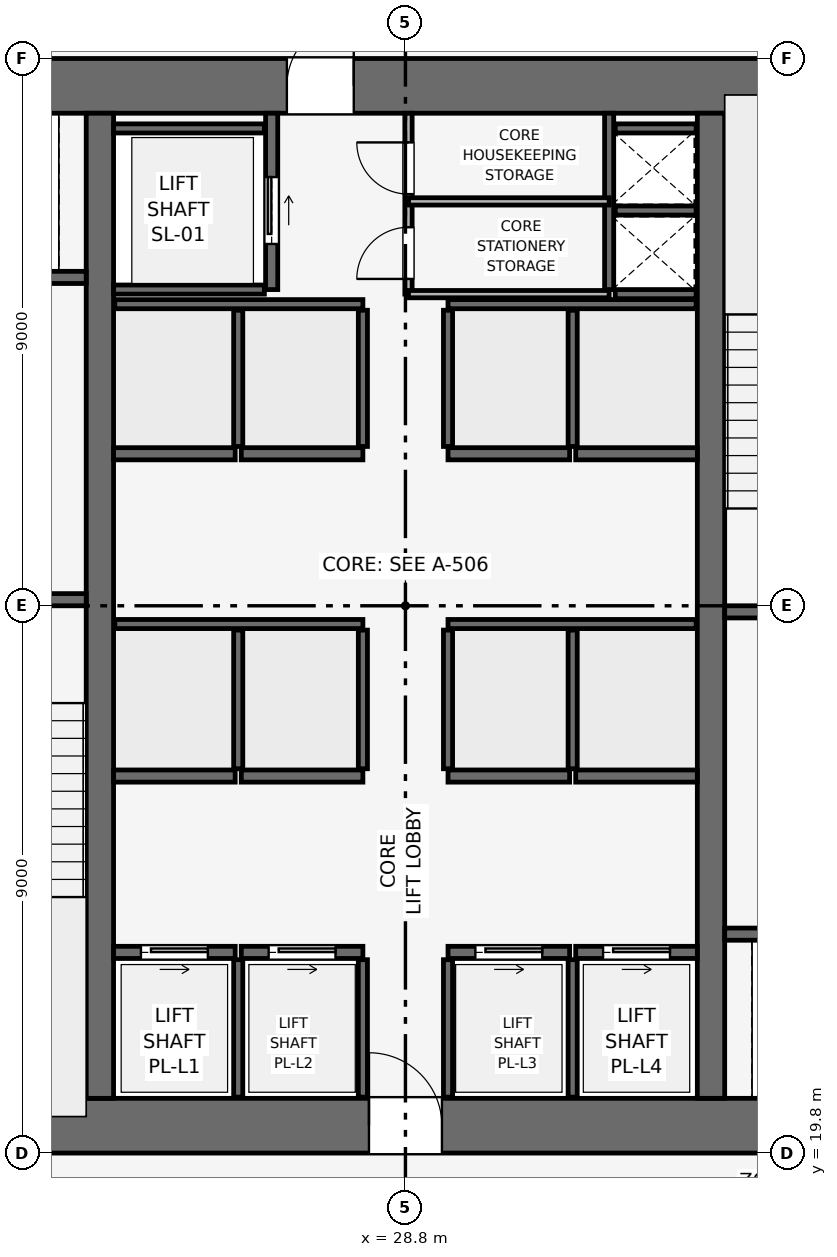
"""IFC4 building model, lengths in metres.
Left out: names, types, materials, properties, quantities, classifications, styles, units other than length and angle.
Written with IfcOpenShell. Run it as: python <this file> out.ifc"""

import sys

from ifc_helpers import new_model, si_unit, direction, frame, frame_2d, origin, place, context, subcontext, project, spatial, rectangle, extrude, element, fill, save


model = new_model("IFC4")
c1 = context("Model", 3, precision=1e-05, world=origin(), true_north=direction((0.0, 1.0)))
c2 = subcontext(c1, "Body", "Model", "MODEL_VIEW")
j1 = project(units=[si_unit("LENGTHUNIT", "METRE"), si_unit("PLANEANGLEUNIT", "RADIAN")], contexts=[c1])
p1 = place(None, origin())
s1 = spatial("IfcSite", under=j1, at=p1, CompositionType="ELEMENT")
p2 = place(p1, origin())
s2 = spatial("IfcBuilding", under=s1, at=p2, CompositionType="ELEMENT")
p3 = place(p2, frame((0.0, 0.0, 117.3)))
s3 = spatial("IfcBuildingStorey", under=s2, at=p3, CompositionType="ELEMENT", Elevation=117.3)
p4 = place(p3, frame((19.8, 20.25, 0.0), z_axis=(0.0, 0.0, 1.0), x_axis=(1.0, 0.0, 0.0)))
e1 = element("IfcWall", 1, at=p4, inside=s3, PredefinedType="SHEAR", context=c2, shape_type="SweptSolid", body=[
    extrude(rectangle(XDim=18.0, YDim=0.9, at=frame_2d((9.0, 0.0))), origin(), (0.0, 0.0, 1.0), 3.9),
])
p5 = place(p4, frame((8.4, 0.0, 0.0)))
e2 = element("IfcOpeningElement", 2, at=p5, cuts=e1, PredefinedType="OPENING", context=c2, shape_type="SweptSolid", body=[
    extrude(rectangle(XDim=1.2, YDim=2.2, at=frame_2d((0.6, 1.1))), frame((0.0, 0.46, 0.0), z_axis=(0.0, -1.0, 0.0), x_axis=(1.0, 0.0, 0.0)), (0.0, 0.0, 1.0), 0.92),
])
p6 = place(p3, frame((19.8, 37.35, 0.0), z_axis=(0.0, 0.0, 1.0), x_axis=(1.0, 0.0, 0.0)))
e3 = element("IfcWall", 3, at=p6, inside=s3, PredefinedType="SHEAR", context=c2, shape_type="SweptSolid", body=[
    extrude(rectangle(XDim=18.0, YDim=0.9, at=frame_2d((9.0, 0.0))), origin(), (0.0, 0.0, 1.0), 3.9),
])
p7 = place(p6, frame((7.05, 0.0, 0.0)))
e4 = element("IfcOpeningElement", 4, at=p7, cuts=e3, PredefinedType="OPENING", context=c2, shape_type="SweptSolid", body=[
    extrude(rectangle(XDim=1.1, YDim=2.15, at=frame_2d((0.55, 1.075))), frame((0.0, 0.46, 0.0), z_axis=(0.0, -1.0, 0.0), x_axis=(1.0, 0.0, 0.0)), (0.0, 0.0, 1.0), 0.92),
])
for number, where, z_axis, x_axis in (
    (5, (23.775, 20.7, 0.0), (0.0, 0.0, 1.0), (0.0, 1.0, 0.0)),
    (6, (33.825, 20.7, 0.0), (0.0, 0.0, 1.0), (0.0, 1.0, 0.0)),
):
    element("IfcWall", number, at=place(p3, frame(where, z_axis=z_axis, x_axis=x_axis)), inside=s3, PredefinedType="SHEAR", context=c2, shape_type="SweptSolid", body=[
        extrude(rectangle(XDim=16.2, YDim=0.45, at=frame_2d((8.1, 0.0))), origin(), (0.0, 0.0, 1.0), 3.9),
    ])
p8 = place(p3, frame((20.4, 28.9, 0.0), z_axis=(0.0, 0.0, 1.0), x_axis=(1.0, 0.0, 0.0)))
e7 = element("IfcWall", 7, at=p8, inside=s3, PredefinedType="SHEAR", context=c2, shape_type="SweptSolid", body=[
    extrude(rectangle(XDim=3.15, YDim=0.2, at=frame_2d((1.575, 0.0))), origin(), (0.0, 0.0, 1.0), 3.65),
])
p9 = place(p8, frame((0.8, 0.0, 0.0)))
e8 = element("IfcOpeningElement", 8, at=p9, cuts=e7, PredefinedType="OPENING", context=c2, shape_type="SweptSolid", body=[
    extrude(rectangle(XDim=1.0, YDim=2.1, at=frame_2d((0.5, 1.05))), frame((0.0, 0.11, 0.0), z_axis=(0.0, -1.0, 0.0), x_axis=(1.0, 0.0, 0.0)), (0.0, 0.0, 1.0), 0.22),
])
p10 = place(p3, frame((34.05, 28.7, 0.0), z_axis=(0.0, 0.0, 1.0), x_axis=(1.0, 0.0, 0.0)))
e9 = element("IfcWall", 9, at=p10, inside=s3, PredefinedType="SHEAR", context=c2, shape_type="SweptSolid", body=[
    extrude(rectangle(XDim=3.15, YDim=0.2, at=frame_2d((1.575, 0.0))), origin(), (0.0, 0.0, 1.0), 3.65),
])
p11 = place(p10, frame((0.8, 0.0, 0.0)))
e10 = element("IfcOpeningElement", 10, at=p11, cuts=e9, PredefinedType="OPENING", context=c2, shape_type="SweptSolid", body=[
    extrude(rectangle(XDim=1.0, YDim=2.1, at=frame_2d((0.5, 1.05))), frame((0.0, 0.11, 0.0), z_axis=(0.0, -1.0, 0.0), x_axis=(1.0, 0.0, 0.0)), (0.0, 0.0, 1.0), 0.22),
])
p12 = place(p3, frame((32.15, 34.0, 0.0), z_axis=(0.0, 0.0, 1.0), x_axis=(0.0, 1.0, 0.0)))
e11 = element("IfcWall", 11, at=p12, inside=s3, PredefinedType="SHEAR", context=c2, shape_type="SweptSolid", body=[
    extrude(rectangle(XDim=2.9, YDim=0.15, at=frame_2d((1.45, 0.0))), origin(), (0.0, 0.0, 1.0), 3.65),
])
for number, where, z_axis, x_axis in (
    (12, (32.25, 33.925, 0.0), (0.0, 0.0, 1.0), (1.0, 0.0, 0.0)),
    (13, (32.25, 35.3, 0.0), (0.0, 0.0, 1.0), (1.0, 0.0, 0.0)),
):
    element("IfcWall", number, at=place(p3, frame(where, z_axis=z_axis, x_axis=x_axis)), inside=s3, PredefinedType="SHEAR", context=c2, shape_type="SweptSolid", body=[
        extrude(rectangle(XDim=1.33, YDim=0.15, at=frame_2d((0.665, 0.0))), origin(), (0.0, 0.0, 1.0), 3.65),
    ])
p13 = place(p3, frame((20.5, 34.2, 0.0), z_axis=(0.0, 0.0, 1.0), x_axis=(1.0, 0.0, 0.0)))
e14 = element("IfcWall", 14, at=p13, inside=s3, PredefinedType="SHEAR", context=c2, shape_type="SweptSolid", body=[
    extrude(rectangle(XDim=3.05, YDim=0.2, at=frame_2d((1.525, 0.0))), origin(), (0.0, 0.0, 1.0), 3.65),
])
p14 = place(p13, frame((0.75, 0.0, 0.0)))
e15 = element("IfcOpeningElement", 15, at=p14, cuts=e14, PredefinedType="OPENING", context=c2, shape_type="SweptSolid", body=[
    extrude(rectangle(XDim=1.1, YDim=2.15, at=frame_2d((0.55, 1.075))), frame((0.0, 0.11, 0.0), z_axis=(0.0, -1.0, 0.0), x_axis=(1.0, 0.0, 0.0)), (0.0, 0.0, 1.0), 0.22),
])
p15 = place(p3, frame((34.05, 23.4, 0.0), z_axis=(0.0, 0.0, 1.0), x_axis=(1.0, 0.0, 0.0)))
e16 = element("IfcWall", 16, at=p15, inside=s3, PredefinedType="SHEAR", context=c2, shape_type="SweptSolid", body=[
    extrude(rectangle(XDim=3.05, YDim=0.2, at=frame_2d((1.525, 0.0))), origin(), (0.0, 0.0, 1.0), 3.65),
])
p16 = place(p15, frame((1.2, 0.0, 0.0)))
e17 = element("IfcOpeningElement", 17, at=p16, cuts=e16, PredefinedType="OPENING", context=c2, shape_type="SweptSolid", body=[
    extrude(rectangle(XDim=1.1, YDim=2.15, at=frame_2d((0.55, 1.075))), frame((0.0, 0.11, 0.0), z_axis=(0.0, -1.0, 0.0), x_axis=(1.0, 0.0, 0.0)), (0.0, 0.0, 1.0), 0.22),
])
p17 = place(p3, frame((26.6, 34.0, 0.0), z_axis=(0.0, 0.0, 1.0), x_axis=(0.0, 1.0, 0.0)))
e18 = element("IfcWall", 18, at=p17, inside=s3, PredefinedType="SHEAR", context=c2, shape_type="SweptSolid", body=[
    extrude(rectangle(XDim=2.9, YDim=0.2, at=frame_2d((1.45, 0.0))), origin(), (0.0, 0.0, 1.0), 3.65),
])
p18 = place(p17, frame((0.75, 0.0, 0.0)))
e19 = element("IfcOpeningElement", 19, at=p18, cuts=e18, PredefinedType="OPENING", context=c2, shape_type="SweptSolid", body=[
    extrude(rectangle(XDim=1.1, YDim=2.15, at=frame_2d((0.55, 1.075))), frame((0.0, 0.11, 0.0), z_axis=(0.0, -1.0, 0.0), x_axis=(1.0, 0.0, 0.0)), (0.0, 0.0, 1.0), 0.22),
])
for number, where, z_axis, x_axis in (
    (20, (24.0, 34.0, 0.0), (0.0, 0.0, 1.0), (1.0, 0.0, 0.0)),
    (21, (24.0, 36.65, 0.0), (0.0, 0.0, 1.0), (1.0, 0.0, 0.0)),
):
    element("IfcWall", number, at=place(p3, frame(where, z_axis=z_axis, x_axis=x_axis)), inside=s3, PredefinedType="SHEAR", context=c2, shape_type="SweptSolid", body=[
        extrude(rectangle(XDim=2.48, YDim=0.15, at=frame_2d((1.24, 0.0))), origin(), (0.0, 0.0, 1.0), 3.65),
    ])
p19 = place(p3, frame((24.0, 23.1, 0.0), z_axis=(0.0, 0.0, 1.0), x_axis=(1.0, 0.0, 0.0)))
e22 = element("IfcWall", 22, at=p19, inside=s3, PredefinedType="SHEAR", context=c2, shape_type="SweptSolid", body=[
    extrude(rectangle(XDim=2.0, YDim=0.2, at=frame_2d((1.0, 0.0))), origin(), (0.0, 0.0, 1.0), 3.65),
])
p20 = place(p19, frame((0.45, 0.0, 0.0)))
e23 = element("IfcOpeningElement", 23, at=p20, cuts=e22, PredefinedType="OPENING", context=c2, shape_type="SweptSolid", body=[
    extrude(rectangle(XDim=1.1, YDim=2.15, at=frame_2d((0.55, 1.075))), frame((0.0, 0.11, 0.0), z_axis=(0.0, -1.0, 0.0), x_axis=(1.0, 0.0, 0.0)), (0.0, 0.0, 1.0), 0.22),
])
p21 = place(p3, frame((26.1, 23.1, 0.0), z_axis=(0.0, 0.0, 1.0), x_axis=(1.0, 0.0, 0.0)))
e24 = element("IfcWall", 24, at=p21, inside=s3, PredefinedType="SHEAR", context=c2, shape_type="SweptSolid", body=[
    extrude(rectangle(XDim=2.0, YDim=0.2, at=frame_2d((1.0, 0.0))), origin(), (0.0, 0.0, 1.0), 3.65),
])
p22 = place(p21, frame((0.45, 0.0, 0.0)))
e25 = element("IfcOpeningElement", 25, at=p22, cuts=e24, PredefinedType="OPENING", context=c2, shape_type="SweptSolid", body=[
    extrude(rectangle(XDim=1.1, YDim=2.15, at=frame_2d((0.55, 1.075))), frame((0.0, 0.11, 0.0), z_axis=(0.0, -1.0, 0.0), x_axis=(1.0, 0.0, 0.0)), (0.0, 0.0, 1.0), 0.22),
])
p23 = place(p3, frame((29.5, 23.1, 0.0), z_axis=(0.0, 0.0, 1.0), x_axis=(1.0, 0.0, 0.0)))
e26 = element("IfcWall", 26, at=p23, inside=s3, PredefinedType="SHEAR", context=c2, shape_type="SweptSolid", body=[
    extrude(rectangle(XDim=2.0, YDim=0.2, at=frame_2d((1.0, 0.0))), origin(), (0.0, 0.0, 1.0), 3.65),
])
p24 = place(p23, frame((0.45, 0.0, 0.0)))
e27 = element("IfcOpeningElement", 27, at=p24, cuts=e26, PredefinedType="OPENING", context=c2, shape_type="SweptSolid", body=[
    extrude(rectangle(XDim=1.1, YDim=2.15, at=frame_2d((0.55, 1.075))), frame((0.0, 0.11, 0.0), z_axis=(0.0, -1.0, 0.0), x_axis=(1.0, 0.0, 0.0)), (0.0, 0.0, 1.0), 0.22),
])
p25 = place(p3, frame((31.6, 23.1, 0.0), z_axis=(0.0, 0.0, 1.0), x_axis=(1.0, 0.0, 0.0)))
e28 = element("IfcWall", 28, at=p25, inside=s3, PredefinedType="SHEAR", context=c2, shape_type="SweptSolid", body=[
    extrude(rectangle(XDim=2.0, YDim=0.2, at=frame_2d((1.0, 0.0))), origin(), (0.0, 0.0, 1.0), 3.65),
])
p26 = place(p25, frame((0.45, 0.0, 0.0)))
e29 = element("IfcOpeningElement", 29, at=p26, cuts=e28, PredefinedType="OPENING", context=c2, shape_type="SweptSolid", body=[
    extrude(rectangle(XDim=1.1, YDim=2.15, at=frame_2d((0.55, 1.075))), frame((0.0, 0.11, 0.0), z_axis=(0.0, -1.0, 0.0), x_axis=(1.0, 0.0, 0.0)), (0.0, 0.0, 1.0), 0.22),
])
for number, where, z_axis, x_axis in (
    (30, (24.0, 26.0, 0.0), (0.0, 0.0, 1.0), (1.0, 0.0, 0.0)),
    (31, (26.1, 26.0, 0.0), (0.0, 0.0, 1.0), (1.0, 0.0, 0.0)),
    (32, (29.5, 26.0, 0.0), (0.0, 0.0, 1.0), (1.0, 0.0, 0.0)),
    (33, (31.6, 26.0, 0.0), (0.0, 0.0, 1.0), (1.0, 0.0, 0.0)),
    (34, (24.0, 31.3, 0.0), (0.0, 0.0, 1.0), (1.0, 0.0, 0.0)),
    (35, (26.1, 31.3, 0.0), (0.0, 0.0, 1.0), (1.0, 0.0, 0.0)),
    (36, (29.5, 31.3, 0.0), (0.0, 0.0, 1.0), (1.0, 0.0, 0.0)),
    (37, (31.6, 31.3, 0.0), (0.0, 0.0, 1.0), (1.0, 0.0, 0.0)),
):
    element("IfcWall", number, at=place(p3, frame(where, z_axis=z_axis, x_axis=x_axis)), inside=s3, PredefinedType="SHEAR", context=c2, shape_type="SweptSolid", body=[
        extrude(rectangle(XDim=2.0, YDim=0.2, at=frame_2d((1.0, 0.0))), origin(), (0.0, 0.0, 1.0), 3.65),
    ])
p27 = place(p3, frame((32.25, 36.65, 0.0), z_axis=(0.0, 0.0, 1.0), x_axis=(1.0, 0.0, 0.0)))
e38 = element("IfcWall", 38, at=p27, inside=s3, PredefinedType="SHEAR", context=c2, shape_type="SweptSolid", body=[
    extrude(rectangle(XDim=1.33, YDim=0.15, at=frame_2d((0.665, 0.0))), origin(), (0.0, 0.0, 1.0), 3.65),
])
for number, where, z_axis, x_axis in (
    (39, (26.05, 20.72, 0.0), (0.0, 0.0, 1.0), (0.0, 1.0, 0.0)),
    (40, (28.1, 20.72, 0.0), (0.0, 0.0, 1.0), (0.0, 1.0, 0.0)),
    (41, (29.5, 20.72, 0.0), (0.0, 0.0, 1.0), (0.0, 1.0, 0.0)),
    (42, (31.55, 20.72, 0.0), (0.0, 0.0, 1.0), (0.0, 1.0, 0.0)),
):
    element("IfcWall", number, at=place(p3, frame(where, z_axis=z_axis, x_axis=x_axis)), inside=s3, PredefinedType="SHEAR", context=c2, shape_type="SweptSolid", body=[
        extrude(rectangle(XDim=2.26, YDim=0.15, at=frame_2d((1.13, 0.0))), origin(), (0.0, 0.0, 1.0), 3.65),
    ])
for number, where, z_axis, x_axis in (
    (43, (24.02, 28.5, 0.0), (0.0, 0.0, 1.0), (1.0, 0.0, 0.0)),
    (44, (29.5, 28.5, 0.0), (0.0, 0.0, 1.0), (1.0, 0.0, 0.0)),
):
    element("IfcWall", number, at=place(p3, frame(where, z_axis=z_axis, x_axis=x_axis)), inside=s3, PredefinedType="SHEAR", context=c2, shape_type="SweptSolid", body=[
        extrude(rectangle(XDim=4.08, YDim=0.15, at=frame_2d((2.04, 0.0))), origin(), (0.0, 0.0, 1.0), 3.65),
    ])
for number, where, z_axis, x_axis in (
    (45, (26.05, 26.12, 0.0), (0.0, 0.0, 1.0), (0.0, 1.0, 0.0)),
    (46, (28.1, 26.12, 0.0), (0.0, 0.0, 1.0), (0.0, 1.0, 0.0)),
    (47, (29.5, 26.12, 0.0), (0.0, 0.0, 1.0), (0.0, 1.0, 0.0)),
    (48, (31.55, 26.12, 0.0), (0.0, 0.0, 1.0), (0.0, 1.0, 0.0)),
):
    element("IfcWall", number, at=place(p3, frame(where, z_axis=z_axis, x_axis=x_axis)), inside=s3, PredefinedType="SHEAR", context=c2, shape_type="SweptSolid", body=[
        extrude(rectangle(XDim=2.28, YDim=0.15, at=frame_2d((1.14, 0.0))), origin(), (0.0, 0.0, 1.0), 3.65),
    ])
for number, where, z_axis, x_axis in (
    (49, (24.02, 33.76, 0.0), (0.0, 0.0, 1.0), (1.0, 0.0, 0.0)),
    (50, (29.5, 33.76, 0.0), (0.0, 0.0, 1.0), (1.0, 0.0, 0.0)),
):
    element("IfcWall", number, at=place(p3, frame(where, z_axis=z_axis, x_axis=x_axis)), inside=s3, PredefinedType="SHEAR", context=c2, shape_type="SweptSolid", body=[
        extrude(rectangle(XDim=4.08, YDim=0.15, at=frame_2d((2.04, 0.0))), origin(), (0.0, 0.0, 1.0), 3.65),
    ])
for number, where, z_axis, x_axis in (
    (51, (26.05, 31.42, 0.0), (0.0, 0.0, 1.0), (0.0, 1.0, 0.0)),
    (52, (28.1, 31.42, 0.0), (0.0, 0.0, 1.0), (0.0, 1.0, 0.0)),
    (53, (29.5, 31.42, 0.0), (0.0, 0.0, 1.0), (0.0, 1.0, 0.0)),
    (54, (31.55, 31.42, 0.0), (0.0, 0.0, 1.0), (0.0, 1.0, 0.0)),
):
    element("IfcWall", number, at=place(p3, frame(where, z_axis=z_axis, x_axis=x_axis)), inside=s3, PredefinedType="SHEAR", context=c2, shape_type="SweptSolid", body=[
        extrude(rectangle(XDim=2.24, YDim=0.15, at=frame_2d((1.12, 0.0))), origin(), (0.0, 0.0, 1.0), 3.65),
    ])
p28 = place(p3, frame((28.85, 33.925, 0.0), z_axis=(0.0, 0.0, 1.0), x_axis=(0.0, 1.0, 0.0)))
e55 = element("IfcWall", 55, at=p28, inside=s3, PredefinedType="PARTITIONING", context=c2, shape_type="SweptSolid", body=[
    extrude(rectangle(XDim=2.975, YDim=0.12, at=frame_2d((1.487, 0.0))), origin(), (0.0, 0.0, 1.0), 3.65),
])
p29 = place(p28, frame((0.25, 0.0, 0.0)))
e56 = element("IfcOpeningElement", 56, at=p29, cuts=e55, PredefinedType="OPENING", context=c2, shape_type="SweptSolid", body=[
    extrude(rectangle(XDim=0.85, YDim=2.1, at=frame_2d((0.425, 1.05))), frame((0.0, 0.07, 0.0), z_axis=(0.0, -1.0, 0.0), x_axis=(1.0, 0.0, 0.0)), (0.0, 0.0, 1.0), 0.14),
])
p30 = place(p28, frame((1.645, 0.0, 0.0)))
e57 = element("IfcOpeningElement", 57, at=p30, cuts=e55, PredefinedType="OPENING", context=c2, shape_type="SweptSolid", body=[
    extrude(rectangle(XDim=0.85, YDim=2.1, at=frame_2d((0.425, 1.05))), frame((0.0, 0.07, 0.0), z_axis=(0.0, -1.0, 0.0), x_axis=(1.0, 0.0, 0.0)), (0.0, 0.0, 1.0), 0.14),
])
for number, where, z_axis, x_axis in (
    (58, (28.85, 35.45, 0.0), (0.0, 0.0, 1.0), (1.0, 0.0, 0.0)),
    (59, (28.85, 33.925, 0.0), (0.0, 0.0, 1.0), (1.0, 0.0, 0.0)),
):
    element("IfcWall", number, at=place(p3, frame(where, z_axis=z_axis, x_axis=x_axis)), inside=s3, PredefinedType="PARTITIONING", context=c2, shape_type="SweptSolid", body=[
        extrude(rectangle(XDim=3.3, YDim=0.12, at=frame_2d((1.65, 0.0))), origin(), (0.0, 0.0, 1.0), 3.65),
    ])
p31 = place(p18, origin())
e60 = element("IfcDoor", 60, at=p31, inside=s3, OperationType="SLIDING_TO_RIGHT", PredefinedType="DOOR", context=c2, shape_type="SweptSolid", body=[
    extrude(rectangle(XDim=1.1, YDim=2.15, at=frame_2d((0.55, 1.075))), frame((0.0, 0.025, 0.0), z_axis=(0.0, -1.0, 0.0), x_axis=(1.0, 0.0, 0.0)), (0.0, 0.0, 1.0), 0.05),
])
fill(e19, e60)
p32 = place(p20, origin())
e61 = element("IfcDoor", 61, at=p32, inside=s3, OperationType="SLIDING_TO_RIGHT", PredefinedType="DOOR", context=c2, shape_type="SweptSolid", body=[
    extrude(rectangle(XDim=1.1, YDim=2.15, at=frame_2d((0.55, 1.075))), frame((0.0, 0.025, 0.0), z_axis=(0.0, -1.0, 0.0), x_axis=(1.0, 0.0, 0.0)), (0.0, 0.0, 1.0), 0.05),
])
fill(e23, e61)
p33 = place(p22, origin())
e62 = element("IfcDoor", 62, at=p33, inside=s3, OperationType="SLIDING_TO_RIGHT", PredefinedType="DOOR", context=c2, shape_type="SweptSolid", body=[
    extrude(rectangle(XDim=1.1, YDim=2.15, at=frame_2d((0.55, 1.075))), frame((0.0, 0.025, 0.0), z_axis=(0.0, -1.0, 0.0), x_axis=(1.0, 0.0, 0.0)), (0.0, 0.0, 1.0), 0.05),
])
fill(e25, e62)
p34 = place(p24, origin())
e63 = element("IfcDoor", 63, at=p34, inside=s3, OperationType="SLIDING_TO_RIGHT", PredefinedType="DOOR", context=c2, shape_type="SweptSolid", body=[
    extrude(rectangle(XDim=1.1, YDim=2.15, at=frame_2d((0.55, 1.075))), frame((0.0, 0.025, 0.0), z_axis=(0.0, -1.0, 0.0), x_axis=(1.0, 0.0, 0.0)), (0.0, 0.0, 1.0), 0.05),
])
fill(e27, e63)
p35 = place(p26, origin())
e64 = element("IfcDoor", 64, at=p35, inside=s3, OperationType="SLIDING_TO_RIGHT", PredefinedType="DOOR", context=c2, shape_type="SweptSolid", body=[
    extrude(rectangle(XDim=1.1, YDim=2.15, at=frame_2d((0.55, 1.075))), frame((0.0, 0.025, 0.0), z_axis=(0.0, -1.0, 0.0), x_axis=(1.0, 0.0, 0.0)), (0.0, 0.0, 1.0), 0.05),
])
fill(e29, e64)
p36 = place(p29, origin())
e65 = element("IfcDoor", 65, at=p36, inside=s3, OperationType="SINGLE_SWING_LEFT", PredefinedType="DOOR", context=c2, shape_type="SweptSolid", body=[
    extrude(rectangle(XDim=0.85, YDim=2.1, at=frame_2d((0.425, 1.05))), frame((0.0, 0.025, 0.0), z_axis=(0.0, -1.0, 0.0), x_axis=(1.0, 0.0, 0.0)), (0.0, 0.0, 1.0), 0.05),
])
fill(e56, e65)
p37 = place(p30, origin())
e66 = element("IfcDoor", 66, at=p37, inside=s3, OperationType="SINGLE_SWING_RIGHT", PredefinedType="DOOR", context=c2, shape_type="SweptSolid", body=[
    extrude(rectangle(XDim=0.85, YDim=2.1, at=frame_2d((0.425, 1.05))), frame((0.0, 0.025, 0.0), z_axis=(0.0, -1.0, 0.0), x_axis=(1.0, 0.0, 0.0)), (0.0, 0.0, 1.0), 0.05),
])
fill(e57, e66)
p38 = place(p5, origin())
e67 = element("IfcDoor", 67, at=p38, inside=s3, OperationType="SINGLE_SWING_LEFT", PredefinedType="DOOR", context=c2, shape_type="SweptSolid", body=[
    extrude(rectangle(XDim=1.2, YDim=2.2, at=frame_2d((0.6, 1.1))), frame((0.0, 0.025, 0.0), z_axis=(0.0, -1.0, 0.0), x_axis=(1.0, 0.0, 0.0)), (0.0, 0.0, 1.0), 0.05),
])
fill(e2, e67)
p39 = place(p7, origin())
e68 = element("IfcDoor", 68, at=p39, inside=s3, OperationType="SINGLE_SWING_RIGHT", PredefinedType="DOOR", context=c2, shape_type="SweptSolid", body=[
    extrude(rectangle(XDim=1.1, YDim=2.15, at=frame_2d((0.55, 1.075))), frame((0.0, 0.025, 0.0), z_axis=(0.0, -1.0, 0.0), x_axis=(1.0, 0.0, 0.0)), (0.0, 0.0, 1.0), 0.05),
])
fill(e4, e68)
save(model, sys.argv[1])
